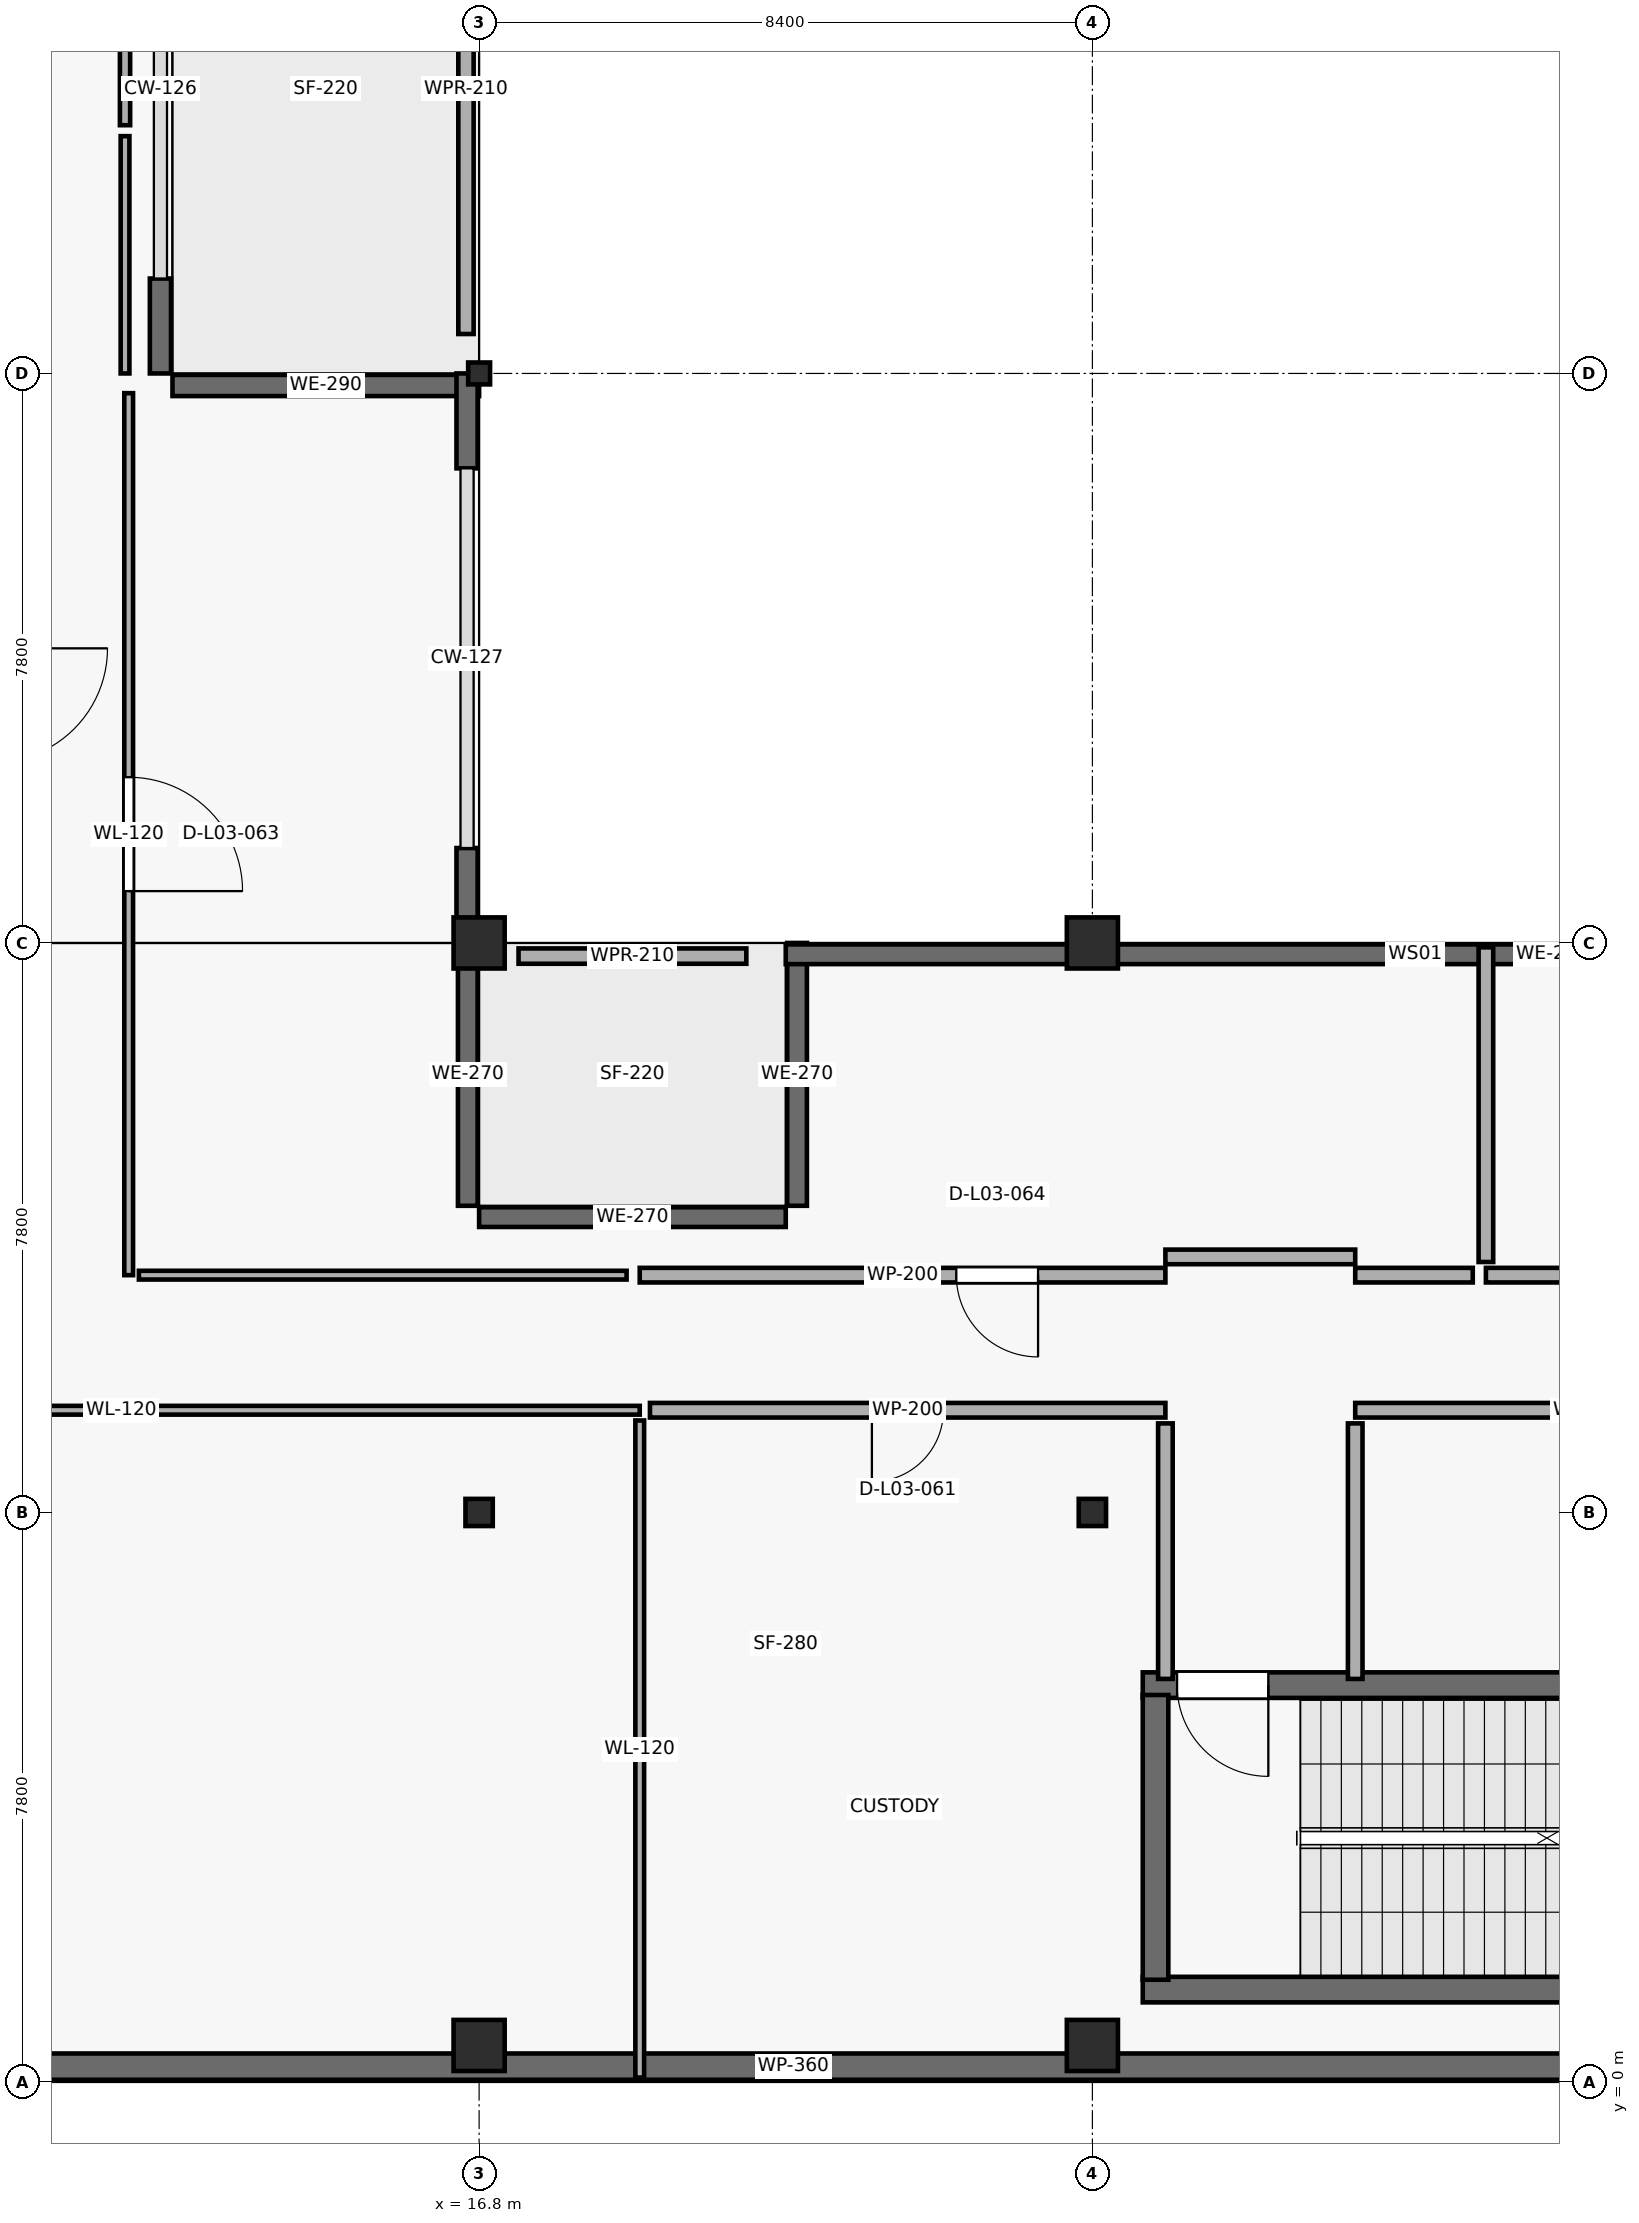
"""IFC4 building model, lengths in metres.
Left out: names, types, materials, properties, quantities, classifications, styles, units other than length and angle.
Written with IfcOpenShell. Run it as: python <this file> out.ifc"""

import sys

from ifc_helpers import new_model, si_unit, direction, frame, frame_2d, origin, origin_2d, place, context, subcontext, project, spatial, rectangle, hollow_rectangle, i_section, extrude, element, fill, save


model = new_model("IFC4")
c1 = context("Model", 3, precision=1e-05, world=origin(), true_north=direction((0.0, 1.0)))
c2 = subcontext(c1, "Body", "Model", "MODEL_VIEW")
j1 = project(units=[si_unit("LENGTHUNIT", "METRE"), si_unit("PLANEANGLEUNIT", "RADIAN")], contexts=[c1])
p1 = place(None, origin())
s1 = spatial("IfcSite", under=j1, at=p1, CompositionType="ELEMENT")
p2 = place(p1, origin())
s2 = spatial("IfcBuilding", under=s1, at=p2, CompositionType="ELEMENT")
p3 = place(p2, frame((0.0, 0.0, 10.2)))
s3 = spatial("IfcBuildingStorey", under=s2, at=p3, CompositionType="ELEMENT", Elevation=10.2)
p4 = place(p3, frame((16.8, 0.5, 0.0), z_axis=(0.0, 0.0, 1.0), x_axis=(1.0, 0.0, 0.0)))
e1 = element("IfcColumn", 1, at=p4, inside=s3, PredefinedType="COLUMN", context=c2, shape_type="SweptSolid", body=[
    extrude(rectangle(XDim=0.7, YDim=0.7, at=origin_2d()), origin(), (0.0, 0.0, 1.0), 5.1),
])
p5 = place(p3, frame((16.8, 7.8, 0.0), z_axis=(0.0, 0.0, 1.0), x_axis=(1.0, 0.0, 0.0)))
e2 = element("IfcColumn", 2, at=p5, inside=s3, PredefinedType="COLUMN", context=c2, shape_type="SweptSolid", body=[
    extrude(i_section(OverallWidth=0.374, OverallDepth=0.372, WebThickness=0.016, FlangeThickness=0.026, at=origin_2d()), origin(), (0.0, 0.0, 1.0), 5.1),
])
p6 = place(p3, frame((16.8, 15.6, 0.0), z_axis=(0.0, 0.0, 1.0), x_axis=(1.0, 0.0, 0.0)))
e3 = element("IfcColumn", 3, at=p6, inside=s3, PredefinedType="COLUMN", context=c2, shape_type="SweptSolid", body=[
    extrude(rectangle(XDim=0.7, YDim=0.7, at=origin_2d()), origin(), (0.0, 0.0, 1.0), 5.1),
])
p7 = place(p3, frame((16.8, 23.4, 0.0), z_axis=(0.0, 0.0, 1.0), x_axis=(1.0, 0.0, 0.0)))
e4 = element("IfcColumn", 4, at=p7, inside=s3, PredefinedType="COLUMN", context=c2, shape_type="SweptSolid", body=[
    extrude(hollow_rectangle(XDim=0.3, YDim=0.3, WallThickness=0.012, at=origin_2d()), origin(), (0.0, 0.0, 1.0), 5.1),
])
p8 = place(p3, frame((25.2, 0.5, 0.0), z_axis=(0.0, 0.0, 1.0), x_axis=(1.0, 0.0, 0.0)))
e5 = element("IfcColumn", 5, at=p8, inside=s3, PredefinedType="COLUMN", context=c2, shape_type="SweptSolid", body=[
    extrude(rectangle(XDim=0.7, YDim=0.7, at=origin_2d()), origin(), (0.0, 0.0, 1.0), 5.1),
])
p9 = place(p3, frame((25.2, 7.8, 0.0), z_axis=(0.0, 0.0, 1.0), x_axis=(1.0, 0.0, 0.0)))
e6 = element("IfcColumn", 6, at=p9, inside=s3, PredefinedType="COLUMN", context=c2, shape_type="SweptSolid", body=[
    extrude(i_section(OverallWidth=0.374, OverallDepth=0.372, WebThickness=0.016, FlangeThickness=0.026, at=origin_2d()), origin(), (0.0, 0.0, 1.0), 5.1),
])
p10 = place(p3, frame((25.2, 15.6, 0.0), z_axis=(0.0, 0.0, 1.0), x_axis=(1.0, 0.0, 0.0)))
e7 = element("IfcColumn", 7, at=p10, inside=s3, PredefinedType="COLUMN", context=c2, shape_type="SweptSolid", body=[
    extrude(rectangle(XDim=0.7, YDim=0.7, at=origin_2d()), origin(), (0.0, 0.0, 1.0), 5.1),
])
p11 = place(p3, frame((12.435, 24.7, 0.0), z_axis=(0.0, 0.0, 1.0), x_axis=(0.0, -1.0, 0.0)))
e8 = element("IfcWall", 8, at=p11, inside=s3, PredefinedType="SOLIDWALL", context=c2, shape_type="SweptSolid", body=[
    extrude(rectangle(XDim=1.3, YDim=0.29, at=frame_2d((0.65, 0.0))), origin(), (0.0, 0.0, 1.0), 4.82),
])
p12 = place(p3, frame((12.6, 23.235, 0.0), z_axis=(0.0, 0.0, 1.0), x_axis=(1.0, 0.0, 0.0)))
e9 = element("IfcWall", 9, at=p12, inside=s3, PredefinedType="SOLIDWALL", context=c2, shape_type="SweptSolid", body=[
    extrude(rectangle(XDim=4.2, YDim=0.29, at=frame_2d((2.1, 0.0))), origin(), (0.0, 0.0, 1.0), 4.82),
])
for number, where, z_axis, x_axis in (
    (10, (16.635, 23.4, 0.0), (0.0, 0.0, 1.0), (0.0, -1.0, 0.0)),
    (11, (16.635, 16.9, 0.0), (0.0, 0.0, 1.0), (0.0, -1.0, 0.0)),
):
    element("IfcWall", number, at=place(p3, frame(where, z_axis=z_axis, x_axis=x_axis)), inside=s3, PredefinedType="SOLIDWALL", context=c2, shape_type="SweptSolid", body=[
        extrude(rectangle(XDim=1.3, YDim=0.29, at=frame_2d((0.65, 0.0))), origin(), (0.0, 0.0, 1.0), 4.82),
    ])
p13 = place(p3, frame((16.645, 15.6, 0.0), z_axis=(0.0, 0.0, 1.0), x_axis=(0.0, -1.0, 0.0)))
e12 = element("IfcWall", 12, at=p13, inside=s3, PredefinedType="SOLIDWALL", context=c2, shape_type="SweptSolid", body=[
    extrude(rectangle(XDim=3.6, YDim=0.27, at=frame_2d((1.8, 0.0))), origin(), (0.0, 0.0, 1.0), 4.82),
])
p14 = place(p3, frame((16.8, 11.845, 0.0), z_axis=(0.0, 0.0, 1.0), x_axis=(1.0, 0.0, 0.0)))
e13 = element("IfcWall", 13, at=p14, inside=s3, PredefinedType="SOLIDWALL", context=c2, shape_type="SweptSolid", body=[
    extrude(rectangle(XDim=4.2, YDim=0.27, at=frame_2d((2.1, 0.0))), origin(), (0.0, 0.0, 1.0), 4.82),
])
p15 = place(p3, frame((21.155, 12.0, 0.0), z_axis=(0.0, 0.0, 1.0), x_axis=(0.0, 1.0, 0.0)))
e14 = element("IfcWall", 14, at=p15, inside=s3, PredefinedType="SOLIDWALL", context=c2, shape_type="SweptSolid", body=[
    extrude(rectangle(XDim=3.6, YDim=0.27, at=frame_2d((1.8, 0.0))), origin(), (0.0, 0.0, 1.0), 4.82),
])
p16 = place(p3, frame((21.0, 15.445, 0.0), z_axis=(0.0, 0.0, 1.0), x_axis=(1.0, 0.0, 0.0)))
e15 = element("IfcWall", 15, at=p16, inside=s3, PredefinedType="SOLIDWALL", context=c2, shape_type="SweptSolid", body=[
    extrude(rectangle(XDim=21.0, YDim=0.27, at=frame_2d((10.5, 0.0))), origin(), (0.0, 0.0, 1.0), 4.82),
])
p17 = place(p16, frame((8.4, 0.0, 1.85)))
e16 = element("IfcOpeningElement", 16, at=p17, cuts=e15, PredefinedType="OPENING", context=c2, shape_type="SweptSolid", body=[
    extrude(rectangle(XDim=0.45, YDim=1.1, at=frame_2d((0.225, 0.55))), frame((0.0, 0.145, 0.0), z_axis=(0.0, -1.0, 0.0), x_axis=(1.0, 0.0, 0.0)), (0.0, 0.0, 1.0), 0.29),
])
p18 = place(p16, frame((14.0, 0.0, 1.85)))
e17 = element("IfcOpeningElement", 17, at=p18, cuts=e15, PredefinedType="OPENING", context=c2, shape_type="SweptSolid", body=[
    extrude(rectangle(XDim=0.45, YDim=1.1, at=frame_2d((0.225, 0.55))), frame((0.0, 0.145, 0.0), z_axis=(0.0, -1.0, 0.0), x_axis=(1.0, 0.0, 0.0)), (0.0, 0.0, 1.0), 0.29),
])
p19 = place(p3, frame((42.0, 0.21, 0.0), z_axis=(0.0, 0.0, 1.0), x_axis=(-1.0, 0.0, 0.0)))
e18 = element("IfcWall", 18, at=p19, inside=s3, PredefinedType="SOLIDWALL", context=c2, shape_type="SweptSolid", body=[
    extrude(rectangle(XDim=41.79, YDim=0.36, at=frame_2d((20.895, 0.0))), origin(), (0.0, 0.0, 1.0), 4.82),
])
p20 = place(p3, frame((17.34, 15.42, 0.0), z_axis=(0.0, 0.0, 1.0), x_axis=(1.0, 0.0, 0.0)))
e19 = element("IfcWall", 19, at=p20, inside=s3, PredefinedType="PARAPET", context=c2, shape_type="SweptSolid", body=[
    extrude(rectangle(XDim=3.12, YDim=0.21, at=frame_2d((1.56, 0.0))), origin(), (0.0, 0.0, 1.0), 1.12),
])
p21 = place(p3, frame((16.62, 30.66, 0.0), z_axis=(0.0, 0.0, 1.0), x_axis=(0.0, -1.0, 0.0)))
e20 = element("IfcWall", 20, at=p21, inside=s3, PredefinedType="PARAPET", context=c2, shape_type="SweptSolid", body=[
    extrude(rectangle(XDim=6.72, YDim=0.21, at=frame_2d((3.36, 0.0))), origin(), (0.0, 0.0, 1.0), 1.12),
])
p22 = place(p3, frame((25.89, 1.265, 0.0), z_axis=(0.0, 0.0, 1.0), x_axis=(1.0, 0.0, 0.0)))
e21 = element("IfcWall", 21, at=p22, inside=s3, PredefinedType="SHEAR", context=c2, shape_type="SweptSolid", body=[
    extrude(rectangle(XDim=9.22, YDim=0.35, at=frame_2d((4.61, 0.0))), origin(), (0.0, 0.0, 1.0), 4.82),
])
p23 = place(p3, frame((35.11, 5.435, 0.0), z_axis=(0.0, 0.0, 1.0), x_axis=(-1.0, 0.0, 0.0)))
e22 = element("IfcWall", 22, at=p23, inside=s3, PredefinedType="SHEAR", context=c2, shape_type="SweptSolid", body=[
    extrude(rectangle(XDim=9.22, YDim=0.35, at=frame_2d((4.61, 0.0))), origin(), (0.0, 0.0, 1.0), 4.82),
])
p24 = place(p23, frame((7.5, 0.0, 0.0)))
e23 = element("IfcOpeningElement", 23, at=p24, cuts=e22, PredefinedType="OPENING", context=c2, shape_type="SweptSolid", body=[
    extrude(rectangle(XDim=1.25, YDim=2.2, at=frame_2d((0.625, 1.1))), frame((0.0, 0.185, 0.0), z_axis=(0.0, -1.0, 0.0), x_axis=(1.0, 0.0, 0.0)), (0.0, 0.0, 1.0), 0.37),
])
p25 = place(p3, frame((26.065, 1.4, 0.0), z_axis=(0.0, 0.0, 1.0), x_axis=(0.0, 1.0, 0.0)))
e24 = element("IfcWall", 24, at=p25, inside=s3, PredefinedType="SHEAR", context=c2, shape_type="SweptSolid", body=[
    extrude(rectangle(XDim=3.9, YDim=0.35, at=frame_2d((1.95, 0.0))), origin(), (0.0, 0.0, 1.0), 4.82),
])
p26 = place(p3, frame((57.8, 11.05, 0.0), z_axis=(0.0, 0.0, 1.0), x_axis=(-1.0, 0.0, 0.0)))
e25 = element("IfcWall", 25, at=p26, inside=s3, PredefinedType="PARTITIONING", context=c2, shape_type="SweptSolid", body=[
    extrude(rectangle(XDim=27.21, YDim=0.2, at=frame_2d((13.605, 0.0))), origin(), (0.0, 0.0, 1.0), 4.0),
])
p27 = place(p26, frame((13.045, 0.0, 0.0)))
e26 = element("IfcOpeningElement", 26, at=p27, cuts=e25, PredefinedType="OPENING", context=c2, shape_type="SweptSolid", body=[
    extrude(rectangle(XDim=1.12, YDim=2.15, at=frame_2d((0.56, 1.075))), frame((0.0, 0.11, 0.0), z_axis=(0.0, -1.0, 0.0), x_axis=(1.0, 0.0, 0.0)), (0.0, 0.0, 1.0), 0.22),
])
p28 = place(p3, frame((4.8, 9.2, 0.0), z_axis=(0.0, 0.0, 1.0), x_axis=(1.0, 0.0, 0.0)))
e27 = element("IfcWall", 27, at=p28, inside=s3, PredefinedType="PARTITIONING", context=c2, shape_type="SweptSolid", body=[
    extrude(rectangle(XDim=14.2, YDim=0.12, at=frame_2d((7.1, 0.0))), origin(), (0.0, 0.0, 1.0), 4.82),
])
p29 = place(p3, frame((12.0, 11.05, 0.0), z_axis=(0.0, 0.0, 1.0), x_axis=(0.0, 1.0, 0.0)))
e28 = element("IfcWall", 28, at=p29, inside=s3, PredefinedType="PARTITIONING", context=c2, shape_type="SweptSolid", body=[
    extrude(rectangle(XDim=12.08, YDim=0.12, at=frame_2d((6.04, 0.0))), origin(), (0.0, 0.0, 1.0), 4.82),
])
p30 = place(p29, frame((5.26, 0.0, 0.0)))
e29 = element("IfcOpeningElement", 29, at=p30, cuts=e28, PredefinedType="OPENING", context=c2, shape_type="SweptSolid", body=[
    extrude(rectangle(XDim=1.56, YDim=2.44, at=frame_2d((0.78, 1.22))), frame((0.0, 0.07, 0.0), z_axis=(0.0, -1.0, 0.0), x_axis=(1.0, 0.0, 0.0)), (0.0, 0.0, 1.0), 0.14),
])
p31 = place(p3, frame((19.0, 9.06, 0.0), z_axis=(0.0, 0.0, 1.0), x_axis=(0.0, -1.0, 0.0)))
e30 = element("IfcWall", 30, at=p31, inside=s3, PredefinedType="PARTITIONING", context=c2, shape_type="SweptSolid", body=[
    extrude(rectangle(XDim=9.0, YDim=0.12, at=frame_2d((4.5, 0.0))), origin(), (0.0, 0.0, 1.0), 4.82),
])
p32 = place(p3, frame((19.14, 9.2, 0.0), z_axis=(0.0, 0.0, 1.0), x_axis=(1.0, 0.0, 0.0)))
e31 = element("IfcWall", 31, at=p32, inside=s3, PredefinedType="PARTITIONING", context=c2, shape_type="SweptSolid", body=[
    extrude(rectangle(XDim=7.06, YDim=0.2, at=frame_2d((3.53, 0.0))), origin(), (0.0, 0.0, 1.0), 4.82),
])
p33 = place(p32, frame((3.04, 0.0, 0.0)))
e32 = element("IfcOpeningElement", 32, at=p33, cuts=e31, PredefinedType="OPENING", context=c2, shape_type="SweptSolid", body=[
    extrude(rectangle(XDim=0.98, YDim=2.12, at=frame_2d((0.49, 1.06))), frame((0.0, 0.11, 0.0), z_axis=(0.0, -1.0, 0.0), x_axis=(1.0, 0.0, 0.0)), (0.0, 0.0, 1.0), 0.22),
])
p34 = place(p3, frame((26.2, 11.05, 0.0), z_axis=(0.0, 0.0, 1.0), x_axis=(-1.0, 0.0, 0.0)))
e33 = element("IfcWall", 33, at=p34, inside=s3, PredefinedType="PARTITIONING", context=c2, shape_type="SweptSolid", body=[
    extrude(rectangle(XDim=7.2, YDim=0.2, at=frame_2d((3.6, 0.0))), origin(), (0.0, 0.0, 1.0), 4.0),
])
p35 = place(p34, frame((1.744, 0.0, 0.0)))
e34 = element("IfcOpeningElement", 34, at=p35, cuts=e33, PredefinedType="OPENING", context=c2, shape_type="SweptSolid", body=[
    extrude(rectangle(XDim=1.12, YDim=2.15, at=frame_2d((0.56, 1.075))), frame((0.0, 0.11, 0.0), z_axis=(0.0, -1.0, 0.0), x_axis=(1.0, 0.0, 0.0)), (0.0, 0.0, 1.0), 0.22),
])
p36 = place(p3, frame((18.82, 11.05, 0.0), z_axis=(0.0, 0.0, 1.0), x_axis=(-1.0, 0.0, 0.0)))
e35 = element("IfcWall", 35, at=p36, inside=s3, PredefinedType="PARTITIONING", context=c2, shape_type="SweptSolid", body=[
    extrude(rectangle(XDim=6.68, YDim=0.12, at=frame_2d((3.34, 0.0))), origin(), (0.0, 0.0, 1.0), 4.82),
])
p37 = place(p3, frame((28.8, 9.2, 0.0), z_axis=(0.0, 0.0, 1.0), x_axis=(1.0, 0.0, 0.0)))
e36 = element("IfcWall", 36, at=p37, inside=s3, PredefinedType="PARTITIONING", context=c2, shape_type="SweptSolid", body=[
    extrude(rectangle(XDim=6.4, YDim=0.2, at=frame_2d((3.2, 0.0))), origin(), (0.0, 0.0, 1.0), 4.82),
])
p38 = place(p3, frame((30.59, 11.23, 0.0), z_axis=(0.0, 0.0, 1.0), x_axis=(0.0, 1.0, 0.0)))
e37 = element("IfcWall", 37, at=p38, inside=s3, PredefinedType="PARTITIONING", context=c2, shape_type="SweptSolid", body=[
    extrude(rectangle(XDim=4.31, YDim=0.2, at=frame_2d((2.155, 0.0))), origin(), (0.0, 0.0, 1.0), 4.82),
])
p39 = place(p3, frame((11.95, 26.8, 0.0), z_axis=(0.0, 0.0, 1.0), x_axis=(0.0, 1.0, 0.0)))
e38 = element("IfcWall", 38, at=p39, inside=s3, PredefinedType="PARTITIONING", context=c2, shape_type="SweptSolid", body=[
    extrude(rectangle(XDim=4.4, YDim=0.14, at=frame_2d((2.2, 0.0))), origin(), (0.0, 0.0, 1.0), 4.82),
])
for number, where, z_axis, x_axis in (
    (39, (26.2, 9.02, 0.0), (0.0, 0.0, 1.0), (0.0, -1.0, 0.0)),
    (40, (28.8, 5.52, 0.0), (0.0, 0.0, 1.0), (0.0, 1.0, 0.0)),
):
    element("IfcWall", number, at=place(p3, frame(where, z_axis=z_axis, x_axis=x_axis)), inside=s3, PredefinedType="PARTITIONING", context=c2, shape_type="SweptSolid", body=[
        extrude(rectangle(XDim=3.5, YDim=0.2, at=frame_2d((1.75, 0.0))), origin(), (0.0, 0.0, 1.0), 4.82),
    ])
p40 = place(p3, frame((11.95, 23.4, 0.0), z_axis=(0.0, 0.0, 1.0), x_axis=(0.0, 1.0, 0.0)))
e41 = element("IfcWall", 41, at=p40, inside=s3, PredefinedType="PARTITIONING", context=c2, shape_type="SweptSolid", body=[
    extrude(rectangle(XDim=3.25, YDim=0.12, at=frame_2d((1.625, 0.0))), origin(), (0.0, 0.0, 1.0), 4.82),
])
p41 = place(p3, frame((28.8, 11.3, 0.0), z_axis=(0.0, 0.0, 1.0), x_axis=(-1.0, 0.0, 0.0)))
e42 = element("IfcWall", 42, at=p41, inside=s3, PredefinedType="PARTITIONING", context=c2, shape_type="SweptSolid", body=[
    extrude(rectangle(XDim=2.6, YDim=0.2, at=frame_2d((1.3, 0.0))), origin(), (0.0, 0.0, 1.0), 4.0),
])
p42 = place(p3, frame((30.41, 11.05, 0.0), z_axis=(0.0, 0.0, 1.0), x_axis=(-1.0, 0.0, 0.0)))
e43 = element("IfcWall", 43, at=p42, inside=s3, PredefinedType="PARTITIONING", context=c2, shape_type="SweptSolid", body=[
    extrude(rectangle(XDim=1.61, YDim=0.2, at=frame_2d((0.805, 0.0))), origin(), (0.0, 0.0, 1.0), 4.0),
])
p43 = place(p17, origin())
e44 = element("IfcWindow", 44, at=p43, inside=s3, PartitioningType="SINGLE_PANEL", PredefinedType="WINDOW", context=c2, shape_type="SweptSolid", body=[
    extrude(rectangle(XDim=0.45, YDim=1.1, at=frame_2d((0.225, 0.55))), frame((0.0, 0.03, 0.0), z_axis=(0.0, -1.0, 0.0), x_axis=(1.0, 0.0, 0.0)), (0.0, 0.0, 1.0), 0.06),
])
fill(e16, e44)
p44 = place(p24, origin())
e45 = element("IfcDoor", 45, at=p44, inside=s3, OperationType="SINGLE_SWING_LEFT", PredefinedType="DOOR", context=c2, shape_type="SweptSolid", body=[
    extrude(rectangle(XDim=1.25, YDim=2.2, at=frame_2d((0.625, 1.1))), frame((0.0, 0.025, 0.0), z_axis=(0.0, -1.0, 0.0), x_axis=(1.0, 0.0, 0.0)), (0.0, 0.0, 1.0), 0.05),
])
fill(e23, e45)
p45 = place(p33, origin())
e46 = element("IfcDoor", 46, at=p45, inside=s3, OperationType="SINGLE_SWING_RIGHT", PredefinedType="DOOR", context=c2, shape_type="SweptSolid", body=[
    extrude(rectangle(XDim=0.98, YDim=2.12, at=frame_2d((0.49, 1.06))), frame((0.0, 0.025, 0.0), z_axis=(0.0, -1.0, 0.0), x_axis=(1.0, 0.0, 0.0)), (0.0, 0.0, 1.0), 0.05),
])
fill(e32, e46)
p46 = place(p30, origin())
e47 = element("IfcDoor", 47, at=p46, inside=s3, OperationType="SINGLE_SWING_RIGHT", PredefinedType="DOOR", context=c2, shape_type="SweptSolid", body=[
    extrude(rectangle(XDim=1.56, YDim=2.44, at=frame_2d((0.78, 1.22))), frame((0.0, 0.025, 0.0), z_axis=(0.0, -1.0, 0.0), x_axis=(1.0, 0.0, 0.0)), (0.0, 0.0, 1.0), 0.05),
])
fill(e29, e47)
p47 = place(p35, origin())
e48 = element("IfcDoor", 48, at=p47, inside=s3, OperationType="SINGLE_SWING_LEFT", PredefinedType="DOOR", context=c2, shape_type="SweptSolid", body=[
    extrude(rectangle(XDim=1.12, YDim=2.15, at=frame_2d((0.56, 1.075))), frame((0.0, 0.025, 0.0), z_axis=(0.0, -1.0, 0.0), x_axis=(1.0, 0.0, 0.0)), (0.0, 0.0, 1.0), 0.05),
])
fill(e34, e48)
save(model, sys.argv[1])
